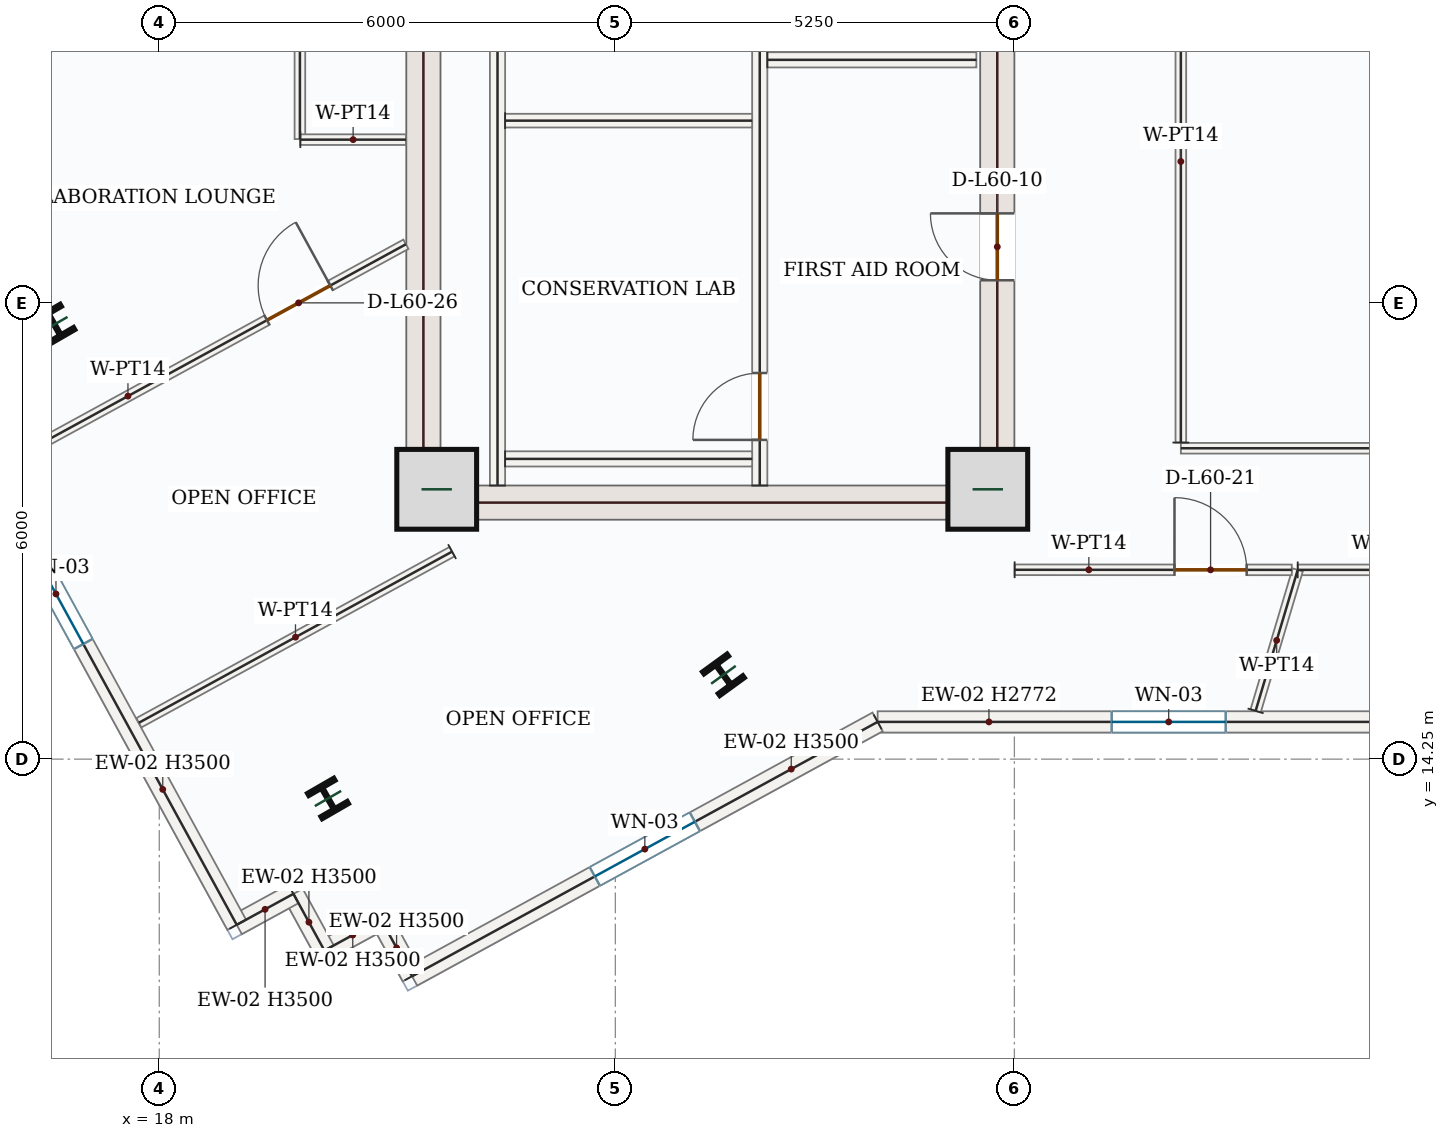
"""IFC4 building model, lengths in metres.
Left out: names, types, materials, properties, quantities, classifications, styles, units other than length and angle.
Written with IfcOpenShell. Run it as: python <this file> out.ifc"""

import sys

from ifc_helpers import new_model, si_unit, direction, frame, frame_2d, origin, origin_2d, place, context, subcontext, project, spatial, rectangle, i_section, extrude, source, transform, mapped, element, fill, save


model = new_model("IFC4")
c1 = context("Model", 3, precision=1e-05, world=origin(), true_north=direction((0.0, 1.0)))
c2 = subcontext(c1, "Body", "Model", "MODEL_VIEW")
j1 = project(units=[si_unit("LENGTHUNIT", "METRE"), si_unit("PLANEANGLEUNIT", "RADIAN")], contexts=[c1])
p1 = place(None, origin())
s1 = spatial("IfcSite", under=j1, at=p1, CompositionType="ELEMENT")
p2 = place(p1, origin())
s2 = spatial("IfcBuilding", under=s1, at=p2, CompositionType="ELEMENT")
p3 = place(p2, frame((0.0, 0.0, 254.1)))
s3 = spatial("IfcBuildingStorey", under=s2, at=p3, CompositionType="ELEMENT", Elevation=254.1)
m1 = source(origin(), c2, "Body", "SweptSolid", [
    extrude(rectangle(XDim=8.55, YDim=0.45, at=frame_2d((4.275, 0.0))), origin(), (0.0, 0.0, 1.0), 3.5),
])
p4 = place(p3, frame((21.475, 17.4, 0.0), z_axis=(0.0, 0.0, 1.0), x_axis=(0.0, 1.0, 0.0)))
e1 = element("IfcWall", 1, at=p4, inside=s3, PredefinedType="SHEAR", context=c2, shape_type="MappedRepresentation", body=[
    mapped(m1, transform((0.0, 0.0, 0.0), x_axis=(1.0, 0.0, 0.0), y_axis=(0.0, 1.0, 0.0), z_axis=(0.0, 0.0, 1.0), scale=1.0)),
])
p5 = place(p3, frame((29.025, 17.4, 0.0), z_axis=(0.0, 0.0, 1.0), x_axis=(0.0, 1.0, 0.0)))
e2 = element("IfcWall", 2, at=p5, inside=s3, PredefinedType="SHEAR", context=c2, shape_type="SweptSolid", body=[
    extrude(rectangle(XDim=8.55, YDim=0.45, at=frame_2d((4.275, 0.0))), origin(), (0.0, 0.0, 1.0), 3.5),
])
p6 = place(p5, frame((6.65, 0.0, 0.0)))
e3 = element("IfcOpeningElement", 3, at=p6, cuts=e2, PredefinedType="OPENING", context=c2, shape_type="SweptSolid", body=[
    extrude(rectangle(XDim=1.1, YDim=2.2, at=frame_2d((0.55, 1.1))), frame((0.0, 0.235, 0.0), z_axis=(0.0, -1.0, 0.0), x_axis=(1.0, 0.0, 0.0)), (0.0, 0.0, 1.0), 0.47),
])
p7 = place(p5, frame((3.15, 0.0, 0.0)))
e4 = element("IfcOpeningElement", 4, at=p7, cuts=e2, PredefinedType="OPENING", context=c2, shape_type="SweptSolid", body=[
    extrude(rectangle(XDim=0.88, YDim=2.1, at=frame_2d((0.44, 1.05))), frame((0.0, 0.235, 0.0), z_axis=(0.0, -1.0, 0.0), x_axis=(1.0, 0.0, 0.0)), (0.0, 0.0, 1.0), 0.47),
])
m2 = source(origin(), c2, "Body", "SweptSolid", [
    extrude(rectangle(XDim=7.1, YDim=0.45, at=frame_2d((3.55, 0.0))), origin(), (0.0, 0.0, 1.0), 3.5),
])
p8 = place(p3, frame((21.7, 17.625, 0.0), z_axis=(0.0, 0.0, 1.0), x_axis=(1.0, 0.0, 0.0)))
e5 = element("IfcWall", 5, at=p8, inside=s3, PredefinedType="SHEAR", context=c2, shape_type="MappedRepresentation", body=[
    mapped(m2, transform((0.0, 0.0, 0.0), x_axis=(1.0, 0.0, 0.0), y_axis=(0.0, 1.0, 0.0), z_axis=(0.0, 0.0, 1.0), scale=1.0)),
])
m3 = source(origin(), c2, "Body", "SweptSolid", [
    extrude(rectangle(XDim=1.05, YDim=1.05, at=origin_2d()), origin(), (0.0, 0.0, 1.0), 3.75),
])
for number, where, z_axis, x_axis in (
    (6, (21.65, 17.8, 0.0), (0.0, 0.0, 1.0), (1.0, 0.0, 0.0)),
    (7, (28.9, 17.8, 0.0), (0.0, 0.0, 1.0), (1.0, 0.0, 0.0)),
):
    element("IfcColumn", number, at=place(p3, frame(where, z_axis=z_axis, x_axis=x_axis)), inside=s3, PredefinedType="COLUMN", context=c2, shape_type="MappedRepresentation", body=[
        mapped(m3, transform((0.0, 0.0, 0.0), x_axis=(1.0, 0.0, 0.0), y_axis=(0.0, 1.0, 0.0), z_axis=(0.0, 0.0, 1.0), scale=1.0)),
    ])
m4 = source(origin(), c2, "Body", "SweptSolid", [
    extrude(i_section(OverallWidth=0.399, OverallDepth=0.386, WebThickness=0.021, FlangeThickness=0.033, FilletRadius=0.018, at=origin_2d()), origin(), (0.0, 0.0, 1.0), 3.75),
])
for number, where, z_axis, x_axis in (
    (8, (25.422, 15.359, 0.0), (0.0, 0.0, 1.0), (0.809, 0.588, 0.0)),
    (9, (16.62, 19.968, 0.0), (0.0, 0.0, 1.0), (0.866, 0.5, 0.0)),
    (10, (20.22, 13.732, 0.0), (0.0, 0.0, 1.0), (0.866, 0.5, 0.0)),
):
    element("IfcColumn", number, at=place(p3, frame(where, z_axis=z_axis, x_axis=x_axis)), inside=s3, PredefinedType="COLUMN", context=c2, shape_type="MappedRepresentation", body=[
        mapped(m4, transform((0.0, 0.0, 0.0), x_axis=(1.0, 0.0, 0.0), y_axis=(0.0, 1.0, 0.0), z_axis=(0.0, 0.0, 1.0), scale=1.0)),
    ])
p9 = place(p3, frame((35.109, 14.74, 0.0), z_axis=(0.0, 0.0, 1.0), x_axis=(-1.0, 0.0, 0.0)))
e11 = element("IfcWall", 11, at=p9, inside=s3, PredefinedType="SOLIDWALL", context=c2, shape_type="SweptSolid", body=[
    extrude(rectangle(XDim=7.658, YDim=0.28, at=frame_2d((3.829, 0.0))), origin(), (0.0, 0.0, 1.0), 2.772),
])
p10 = place(p9, frame((3.079, 0.0, 0.85)))
e12 = element("IfcOpeningElement", 12, at=p10, cuts=e11, PredefinedType="OPENING", context=c2, shape_type="SweptSolid", body=[
    extrude(rectangle(XDim=1.5, YDim=1.5, at=frame_2d((0.75, 0.75))), frame((0.0, 0.15, 0.0), z_axis=(0.0, -1.0, 0.0), x_axis=(1.0, 0.0, 0.0)), (0.0, 0.0, 1.0), 0.3),
])
p11 = place(p3, frame((27.451, 14.74, 0.0), z_axis=(0.0, 0.0, 1.0), x_axis=(-0.877569176667, -0.479450039279, 0.0)))
e13 = element("IfcWall", 13, at=p11, inside=s3, PredefinedType="SOLIDWALL", context=c2, shape_type="SweptSolid", body=[
    extrude(rectangle(XDim=6.979, YDim=0.28, at=frame_2d((3.49, 0.0))), origin(), (0.0, 0.0, 1.0), 3.5),
])
p12 = place(p11, frame((2.74, 0.0, 0.85)))
e14 = element("IfcOpeningElement", 14, at=p12, cuts=e13, PredefinedType="OPENING", context=c2, shape_type="SweptSolid", body=[
    extrude(rectangle(XDim=1.5, YDim=1.5, at=frame_2d((0.75, 0.75))), frame((0.0, 0.15, 0.0), z_axis=(0.0, -1.0, 0.0), x_axis=(1.0, 0.0, 0.0)), (0.0, 0.0, 1.0), 0.3),
])
m5 = source(origin(), c2, "Body", "SweptSolid", [
    extrude(rectangle(XDim=0.85, YDim=0.28, at=frame_2d((0.425, 0.0))), origin(), (0.0, 0.0, 1.0), 3.5),
])
for number, where, z_axis, x_axis in (
    (15, (21.326, 11.394, 0.0), (0.0, 0.0, 1.0), (-0.479, 0.878, 0.0)),
    (16, (20.918, 12.14, 0.0), (0.0, 0.0, 1.0), (-0.878, -0.479, 0.0)),
):
    element("IfcWall", number, at=place(p3, frame(where, z_axis=z_axis, x_axis=x_axis)), inside=s3, PredefinedType="SOLIDWALL", context=c2, shape_type="MappedRepresentation", body=[
        mapped(m5, transform((0.0, 0.0, 0.0), x_axis=(1.0, 0.0, 0.0), y_axis=(0.0, 1.0, 0.0), z_axis=(0.0, 0.0, 1.0), scale=1.0)),
    ])
m6 = source(origin(), c2, "Body", "SweptSolid", [
    extrude(rectangle(XDim=0.85, YDim=0.28, at=frame_2d((0.425, 0.0))), origin(), (0.0, 0.0, 1.0), 3.5),
])
p13 = place(p3, frame((20.173, 11.732, 0.0), z_axis=(0.0, 0.0, 1.0), x_axis=(-0.479656876283, 0.877456141943, 0.0)))
e17 = element("IfcWall", 17, at=p13, inside=s3, PredefinedType="SOLIDWALL", context=c2, shape_type="MappedRepresentation", body=[
    mapped(m6, transform((0.0, 0.0, 0.0), x_axis=(1.0, 0.0, 0.0), y_axis=(0.0, 1.0, 0.0), z_axis=(0.0, 0.0, 1.0), scale=1.0)),
])
p14 = place(p3, frame((19.765, 12.478, 0.0), z_axis=(0.0, 0.0, 1.0), x_axis=(-0.877577015132, -0.479435691737, 0.0)))
e18 = element("IfcWall", 18, at=p14, inside=s3, PredefinedType="SOLIDWALL", context=c2, shape_type="MappedRepresentation", body=[
    mapped(m5, transform((0.0, 0.0, 0.0), x_axis=(1.0, 0.0, 0.0), y_axis=(0.0, 1.0, 0.0), z_axis=(0.0, 0.0, 1.0), scale=1.0)),
])
p15 = place(p3, frame((19.019, 12.071, 0.0), z_axis=(0.0, 0.0, 1.0), x_axis=(-0.479472774144, 0.877556755347, 0.0)))
e19 = element("IfcWall", 19, at=p15, inside=s3, PredefinedType="SOLIDWALL", context=c2, shape_type="SweptSolid", body=[
    extrude(rectangle(XDim=9.92, YDim=0.28, at=frame_2d((4.96, 0.0))), origin(), (0.0, 0.0, 1.0), 3.5),
])
p16 = place(p15, frame((4.21, 0.0, 0.85)))
e20 = element("IfcOpeningElement", 20, at=p16, cuts=e19, PredefinedType="OPENING", context=c2, shape_type="SweptSolid", body=[
    extrude(rectangle(XDim=1.5, YDim=1.5, at=frame_2d((0.75, 0.75))), frame((0.0, 0.15, 0.0), z_axis=(0.0, -1.0, 0.0), x_axis=(1.0, 0.0, 0.0)), (0.0, 0.0, 1.0), 0.3),
])
m7 = source(origin(), c2, "Body", "SweptSolid", [
    extrude(rectangle(XDim=4.558, YDim=0.28, at=frame_2d((2.279, 0.0))), origin(), (0.0, 0.0, 1.0), 3.5),
])
p17 = place(p3, frame((14.94, 23.083, 0.0), z_axis=(0.0, 0.0, 1.0), x_axis=(0.877563774399, 0.479459927276, 0.0)))
e21 = element("IfcWall", 21, at=p17, inside=s3, PredefinedType="SOLIDWALL", context=c2, shape_type="MappedRepresentation", body=[
    mapped(m7, transform((0.0, 0.0, 0.0), x_axis=(1.0, 0.0, 0.0), y_axis=(0.0, 1.0, 0.0), z_axis=(0.0, 0.0, 1.0), scale=1.0)),
])
m8 = source(origin(), c2, "Body", "SweptSolid", [
    extrude(rectangle(XDim=7.87, YDim=0.2, at=frame_2d((3.935, 0.0))), origin(), (0.0, 0.0, 1.0), 3.5),
])
p18 = place(p3, frame((22.45, 17.85, 0.0), z_axis=(0.0, 0.0, 1.0), x_axis=(0.0, 1.0, 0.0)))
e22 = element("IfcWall", 22, at=p18, inside=s3, PredefinedType="SOLIDWALL", context=c2, shape_type="MappedRepresentation", body=[
    mapped(m8, transform((0.0, 0.0, 0.0), x_axis=(1.0, 0.0, 0.0), y_axis=(0.0, 1.0, 0.0), z_axis=(0.0, 0.0, 1.0), scale=1.0)),
])
p19 = place(p3, frame((25.9, 17.85, 0.0), z_axis=(0.0, 0.0, 1.0), x_axis=(0.0, 1.0, 0.0)))
e23 = element("IfcWall", 23, at=p19, inside=s3, PredefinedType="SOLIDWALL", context=c2, shape_type="SweptSolid", body=[
    extrude(rectangle(XDim=8.0, YDim=0.2, at=frame_2d((4.0, 0.0))), origin(), (0.0, 0.0, 1.0), 3.5),
])
p20 = place(p19, frame((6.2, 0.0, 0.0)))
e24 = element("IfcOpeningElement", 24, at=p20, cuts=e23, PredefinedType="OPENING", context=c2, shape_type="SweptSolid", body=[
    extrude(rectangle(XDim=1.0, YDim=2.15, at=frame_2d((0.5, 1.075))), frame((0.0, 0.11, 0.0), z_axis=(0.0, -1.0, 0.0), x_axis=(1.0, 0.0, 0.0)), (0.0, 0.0, 1.0), 0.22),
])
p21 = place(p19, frame((0.6, 0.0, 0.0)))
e25 = element("IfcOpeningElement", 25, at=p21, cuts=e23, PredefinedType="OPENING", context=c2, shape_type="SweptSolid", body=[
    extrude(rectangle(XDim=0.88, YDim=2.1, at=frame_2d((0.44, 1.05))), frame((0.0, 0.11, 0.0), z_axis=(0.0, -1.0, 0.0), x_axis=(1.0, 0.0, 0.0)), (0.0, 0.0, 1.0), 0.22),
])
m9 = source(origin(), c2, "Body", "SweptSolid", [
    extrude(rectangle(XDim=3.25, YDim=0.2, at=frame_2d((1.625, 0.0))), origin(), (0.0, 0.0, 1.0), 3.5),
])
p22 = place(p3, frame((22.55, 18.2, 0.0), z_axis=(0.0, 0.0, 1.0), x_axis=(1.0, 0.0, 0.0)))
e26 = element("IfcWall", 26, at=p22, inside=s3, PredefinedType="SOLIDWALL", context=c2, shape_type="MappedRepresentation", body=[
    mapped(m9, transform((0.0, 0.0, 0.0), x_axis=(1.0, 0.0, 0.0), y_axis=(0.0, 1.0, 0.0), z_axis=(0.0, 0.0, 1.0), scale=1.0)),
])
m10 = source(origin(), c2, "Body", "SweptSolid", [
    extrude(rectangle(XDim=3.25, YDim=0.18, at=frame_2d((1.625, 0.0))), origin(), (0.0, 0.0, 1.0), 3.5),
])
p23 = place(p3, frame((22.55, 22.65, 0.0), z_axis=(0.0, 0.0, 1.0), x_axis=(1.0, 0.0, 0.0)))
e27 = element("IfcWall", 27, at=p23, inside=s3, PredefinedType="PARTITIONING", context=c2, shape_type="MappedRepresentation", body=[
    mapped(m10, transform((0.0, 0.0, 0.0), x_axis=(1.0, 0.0, 0.0), y_axis=(0.0, 1.0, 0.0), z_axis=(0.0, 0.0, 1.0), scale=1.0)),
])
m11 = source(origin(), c2, "Body", "SweptSolid", [
    extrude(rectangle(XDim=2.75, YDim=0.2, at=frame_2d((1.375, 0.0))), origin(), (0.0, 0.0, 1.0), 3.5),
])
p24 = place(p3, frame((26.0, 23.45, 0.0), z_axis=(0.0, 0.0, 1.0), x_axis=(1.0, 0.0, 0.0)))
e28 = element("IfcWall", 28, at=p24, inside=s3, PredefinedType="SOLIDWALL", context=c2, shape_type="MappedRepresentation", body=[
    mapped(m11, transform((0.0, 0.0, 0.0), x_axis=(1.0, 0.0, 0.0), y_axis=(0.0, 1.0, 0.0), z_axis=(0.0, 0.0, 1.0), scale=1.0)),
])
m12 = source(origin(), c2, "Body", "SweptSolid", [
    extrude(rectangle(XDim=4.695, YDim=0.14, at=frame_2d((2.348, 0.0))), origin(), (0.0, 0.0, 1.0), 3.5),
])
p25 = place(p3, frame((21.852, 16.98, 0.0), z_axis=(0.0, 0.0, 1.0), x_axis=(-0.877559526902, -0.479467701461, 0.0)))
e29 = element("IfcWall", 29, at=p25, inside=s3, PredefinedType="PARTITIONING", context=c2, shape_type="MappedRepresentation", body=[
    mapped(m12, transform((0.0, 0.0, 0.0), x_axis=(1.0, 0.0, 0.0), y_axis=(0.0, 1.0, 0.0), z_axis=(0.0, 0.0, 1.0), scale=1.0)),
])
p26 = place(p3, frame((15.891, 18.099, 0.0), z_axis=(0.0, 0.0, 1.0), x_axis=(0.877574248726, 0.479440755436, 0.0)))
e30 = element("IfcWall", 30, at=p26, inside=s3, PredefinedType="PARTITIONING", context=c2, shape_type="SweptSolid", body=[
    extrude(rectangle(XDim=6.102, YDim=0.14, at=frame_2d((3.051, 0.0))), origin(), (0.0, 0.0, 1.0), 3.5),
])
p27 = place(p26, frame((4.018, 0.0, 0.0)))
e31 = element("IfcOpeningElement", 31, at=p27, cuts=e30, PredefinedType="OPENING", context=c2, shape_type="SweptSolid", body=[
    extrude(rectangle(XDim=0.95, YDim=2.15, at=frame_2d((0.475, 1.075))), frame((0.0, 0.08, 0.0), z_axis=(0.0, -1.0, 0.0), x_axis=(1.0, 0.0, 0.0)), (0.0, 0.0, 1.0), 0.16),
])
p28 = place(p3, frame((19.85, 31.594, 0.0), z_axis=(0.0, 0.0, 1.0), x_axis=(2.657666e-05, -0.999999999647, 0.0)))
e32 = element("IfcWall", 32, at=p28, inside=s3, PredefinedType="PARTITIONING", context=c2, shape_type="SweptSolid", body=[
    extrude(rectangle(XDim=9.186, YDim=0.14, at=frame_2d((4.593, 0.0))), origin(), (0.0, 0.0, 1.0), 3.5),
])
p29 = place(p28, frame((2.883, 0.0, 0.0)))
e33 = element("IfcOpeningElement", 33, at=p29, cuts=e32, PredefinedType="OPENING", context=c2, shape_type="SweptSolid", body=[
    extrude(rectangle(XDim=0.95, YDim=2.15, at=frame_2d((0.475, 1.075))), frame((0.0, 0.08, 0.0), z_axis=(0.0, -1.0, 0.0), x_axis=(1.0, 0.0, 0.0)), (0.0, 0.0, 1.0), 0.16),
])
m13 = source(origin(), c2, "Body", "SweptSolid", [
    extrude(rectangle(XDim=1.389, YDim=0.14, at=frame_2d((0.695, 0.0))), origin(), (0.0, 0.0, 1.0), 3.5),
])
p30 = place(p3, frame((19.856, 22.4, 0.0), z_axis=(0.0, 0.0, 1.0), x_axis=(1.0, 0.0, 0.0)))
e34 = element("IfcWall", 34, at=p30, inside=s3, PredefinedType="PARTITIONING", context=c2, shape_type="MappedRepresentation", body=[
    mapped(m13, transform((0.0, 0.0, 0.0), x_axis=(1.0, 0.0, 0.0), y_axis=(0.0, 1.0, 0.0), z_axis=(0.0, 0.0, 1.0), scale=1.0)),
])
p31 = place(p3, frame((32.978, 16.74, 0.0), z_axis=(0.0, 0.0, 1.0), x_axis=(1.0, 0.0, 0.0)))
e35 = element("IfcWall", 35, at=p31, inside=s3, PredefinedType="PARTITIONING", context=c2, shape_type="SweptSolid", body=[
    extrude(rectangle(XDim=4.879, YDim=0.14, at=frame_2d((2.439, 0.0))), origin(), (0.0, 0.0, 1.0), 3.5),
])
p32 = place(p31, frame((2.554, 0.0, 0.0)))
e36 = element("IfcOpeningElement", 36, at=p32, cuts=e35, PredefinedType="OPENING", context=c2, shape_type="SweptSolid", body=[
    extrude(rectangle(XDim=0.95, YDim=2.15, at=frame_2d((0.475, 1.075))), frame((0.0, 0.08, 0.0), z_axis=(0.0, -1.0, 0.0), x_axis=(1.0, 0.0, 0.0)), (0.0, 0.0, 1.0), 0.16),
])
m14 = source(origin(), c2, "Body", "SweptSolid", [
    extrude(rectangle(XDim=1.936, YDim=0.14, at=frame_2d((0.968, 0.0))), origin(), (0.0, 0.0, 1.0), 3.5),
])
p33 = place(p3, frame((32.424, 14.885, 0.0), z_axis=(0.0, 0.0, 1.0), x_axis=(0.286028613148, 0.958221077028, 0.0)))
e37 = element("IfcWall", 37, at=p33, inside=s3, PredefinedType="PARTITIONING", context=c2, shape_type="MappedRepresentation", body=[
    mapped(m14, transform((0.0, 0.0, 0.0), x_axis=(1.0, 0.0, 0.0), y_axis=(0.0, 1.0, 0.0), z_axis=(0.0, 0.0, 1.0), scale=1.0)),
])
p34 = place(p3, frame((29.253, 16.741, 0.0), z_axis=(0.0, 0.0, 1.0), x_axis=(0.999999943952, -0.000334806463, 0.0)))
e38 = element("IfcWall", 38, at=p34, inside=s3, PredefinedType="PARTITIONING", context=c2, shape_type="SweptSolid", body=[
    extrude(rectangle(XDim=3.646, YDim=0.14, at=frame_2d((1.823, 0.0))), origin(), (0.0, 0.0, 1.0), 3.5),
])
p35 = place(p34, frame((2.103, 0.0, 0.0)))
e39 = element("IfcOpeningElement", 39, at=p35, cuts=e38, PredefinedType="OPENING", context=c2, shape_type="SweptSolid", body=[
    extrude(rectangle(XDim=0.95, YDim=2.15, at=frame_2d((0.475, 1.075))), frame((0.0, 0.08, 0.0), z_axis=(0.0, -1.0, 0.0), x_axis=(1.0, 0.0, 0.0)), (0.0, 0.0, 1.0), 0.16),
])
m15 = source(origin(), c2, "Body", "SweptSolid", [
    extrude(rectangle(XDim=9.12, YDim=0.14, at=frame_2d((4.56, 0.0))), origin(), (0.0, 0.0, 1.0), 3.5),
])
p36 = place(p3, frame((40.56, 18.34, 0.0), z_axis=(0.0, 0.0, 1.0), x_axis=(-1.0, 0.0, 0.0)))
e40 = element("IfcWall", 40, at=p36, inside=s3, PredefinedType="PARTITIONING", context=c2, shape_type="MappedRepresentation", body=[
    mapped(m15, transform((0.0, 0.0, 0.0), x_axis=(1.0, 0.0, 0.0), y_axis=(0.0, 1.0, 0.0), z_axis=(0.0, 0.0, 1.0), scale=1.0)),
])
m16 = source(origin(), c2, "Body", "SweptSolid", [
    extrude(rectangle(XDim=7.395, YDim=0.14, at=frame_2d((3.698, 0.0))), origin(), (0.0, 0.0, 1.0), 3.5),
])
p37 = place(p3, frame((31.44, 18.415, 0.0), z_axis=(0.0, 0.0, 1.0), x_axis=(0.0, 1.0, 0.0)))
e41 = element("IfcWall", 41, at=p37, inside=s3, PredefinedType="PARTITIONING", context=c2, shape_type="MappedRepresentation", body=[
    mapped(m16, transform((0.0, 0.0, 0.0), x_axis=(1.0, 0.0, 0.0), y_axis=(0.0, 1.0, 0.0), z_axis=(0.0, 0.0, 1.0), scale=1.0)),
])
m17 = source(origin(), c2, "Body", "SweptSolid", [
    extrude(rectangle(XDim=1.5, YDim=1.5, at=frame_2d((0.75, 0.75))), frame((0.0, 0.03, 0.0), z_axis=(0.0, -1.0, 0.0), x_axis=(1.0, 0.0, 0.0)), (0.0, 0.0, 1.0), 0.06),
])
p38 = place(p10, origin())
e42 = element("IfcWindow", 42, at=p38, inside=s3, PartitioningType="SINGLE_PANEL", PredefinedType="WINDOW", context=c2, shape_type="MappedRepresentation", body=[
    mapped(m17, transform((0.0, 0.0, 0.0), x_axis=(1.0, 0.0, 0.0), y_axis=(0.0, 1.0, 0.0), z_axis=(0.0, 0.0, 1.0), scale=1.0)),
])
fill(e12, e42)
p39 = place(p12, origin())
e43 = element("IfcWindow", 43, at=p39, inside=s3, PartitioningType="SINGLE_PANEL", PredefinedType="WINDOW", context=c2, shape_type="MappedRepresentation", body=[
    mapped(m17, transform((0.0, 0.0, 0.0), x_axis=(1.0, 0.0, 0.0), y_axis=(0.0, 1.0, 0.0), z_axis=(0.0, 0.0, 1.0), scale=1.0)),
])
fill(e14, e43)
p40 = place(p16, origin())
e44 = element("IfcWindow", 44, at=p40, inside=s3, PartitioningType="SINGLE_PANEL", PredefinedType="WINDOW", context=c2, shape_type="MappedRepresentation", body=[
    mapped(m17, transform((0.0, 0.0, 0.0), x_axis=(1.0, 0.0, 0.0), y_axis=(0.0, 1.0, 0.0), z_axis=(0.0, 0.0, 1.0), scale=1.0)),
])
fill(e20, e44)
m18 = source(origin(), c2, "Body", "SweptSolid", [
    extrude(rectangle(XDim=0.88, YDim=2.1, at=frame_2d((0.44, 1.05))), frame((0.0, 0.025, 0.0), z_axis=(0.0, -1.0, 0.0), x_axis=(1.0, 0.0, 0.0)), (0.0, 0.0, 1.0), 0.05),
])
p41 = place(p21, origin())
e45 = element("IfcDoor", 45, at=p41, inside=s3, OperationType="SINGLE_SWING_LEFT", PredefinedType="DOOR", context=c2, shape_type="MappedRepresentation", body=[
    mapped(m18, transform((0.0, 0.0, 0.0), x_axis=(1.0, 0.0, 0.0), y_axis=(0.0, 1.0, 0.0), z_axis=(0.0, 0.0, 1.0), scale=1.0)),
])
fill(e25, e45)
p42 = place(p7, origin())
e46 = element("IfcDoor", 46, at=p42, inside=s3, OperationType="SINGLE_SWING_RIGHT", PredefinedType="DOOR", context=c2, shape_type="MappedRepresentation", body=[
    mapped(m18, transform((0.0, 0.0, 0.0), x_axis=(1.0, 0.0, 0.0), y_axis=(0.0, 1.0, 0.0), z_axis=(0.0, 0.0, 1.0), scale=1.0)),
])
fill(e4, e46)
m19 = source(origin(), c2, "Body", "SweptSolid", [
    extrude(rectangle(XDim=0.95, YDim=2.15, at=frame_2d((0.475, 1.075))), frame((0.0, 0.025, 0.0), z_axis=(0.0, -1.0, 0.0), x_axis=(1.0, 0.0, 0.0)), (0.0, 0.0, 1.0), 0.05),
])
p43 = place(p35, origin())
e47 = element("IfcDoor", 47, at=p43, inside=s3, OperationType="SINGLE_SWING_LEFT", PredefinedType="DOOR", context=c2, shape_type="MappedRepresentation", body=[
    mapped(m19, transform((0.0, 0.0, 0.0), x_axis=(1.0, 0.0, 0.0), y_axis=(0.0, 1.0, 0.0), z_axis=(0.0, 0.0, 1.0), scale=1.0)),
])
fill(e39, e47)
p44 = place(p27, origin())
e48 = element("IfcDoor", 48, at=p44, inside=s3, OperationType="SINGLE_SWING_RIGHT", PredefinedType="DOOR", context=c2, shape_type="MappedRepresentation", body=[
    mapped(m19, transform((0.0, 0.0, 0.0), x_axis=(1.0, 0.0, 0.0), y_axis=(0.0, 1.0, 0.0), z_axis=(0.0, 0.0, 1.0), scale=1.0)),
])
fill(e31, e48)
save(model, sys.argv[1])
